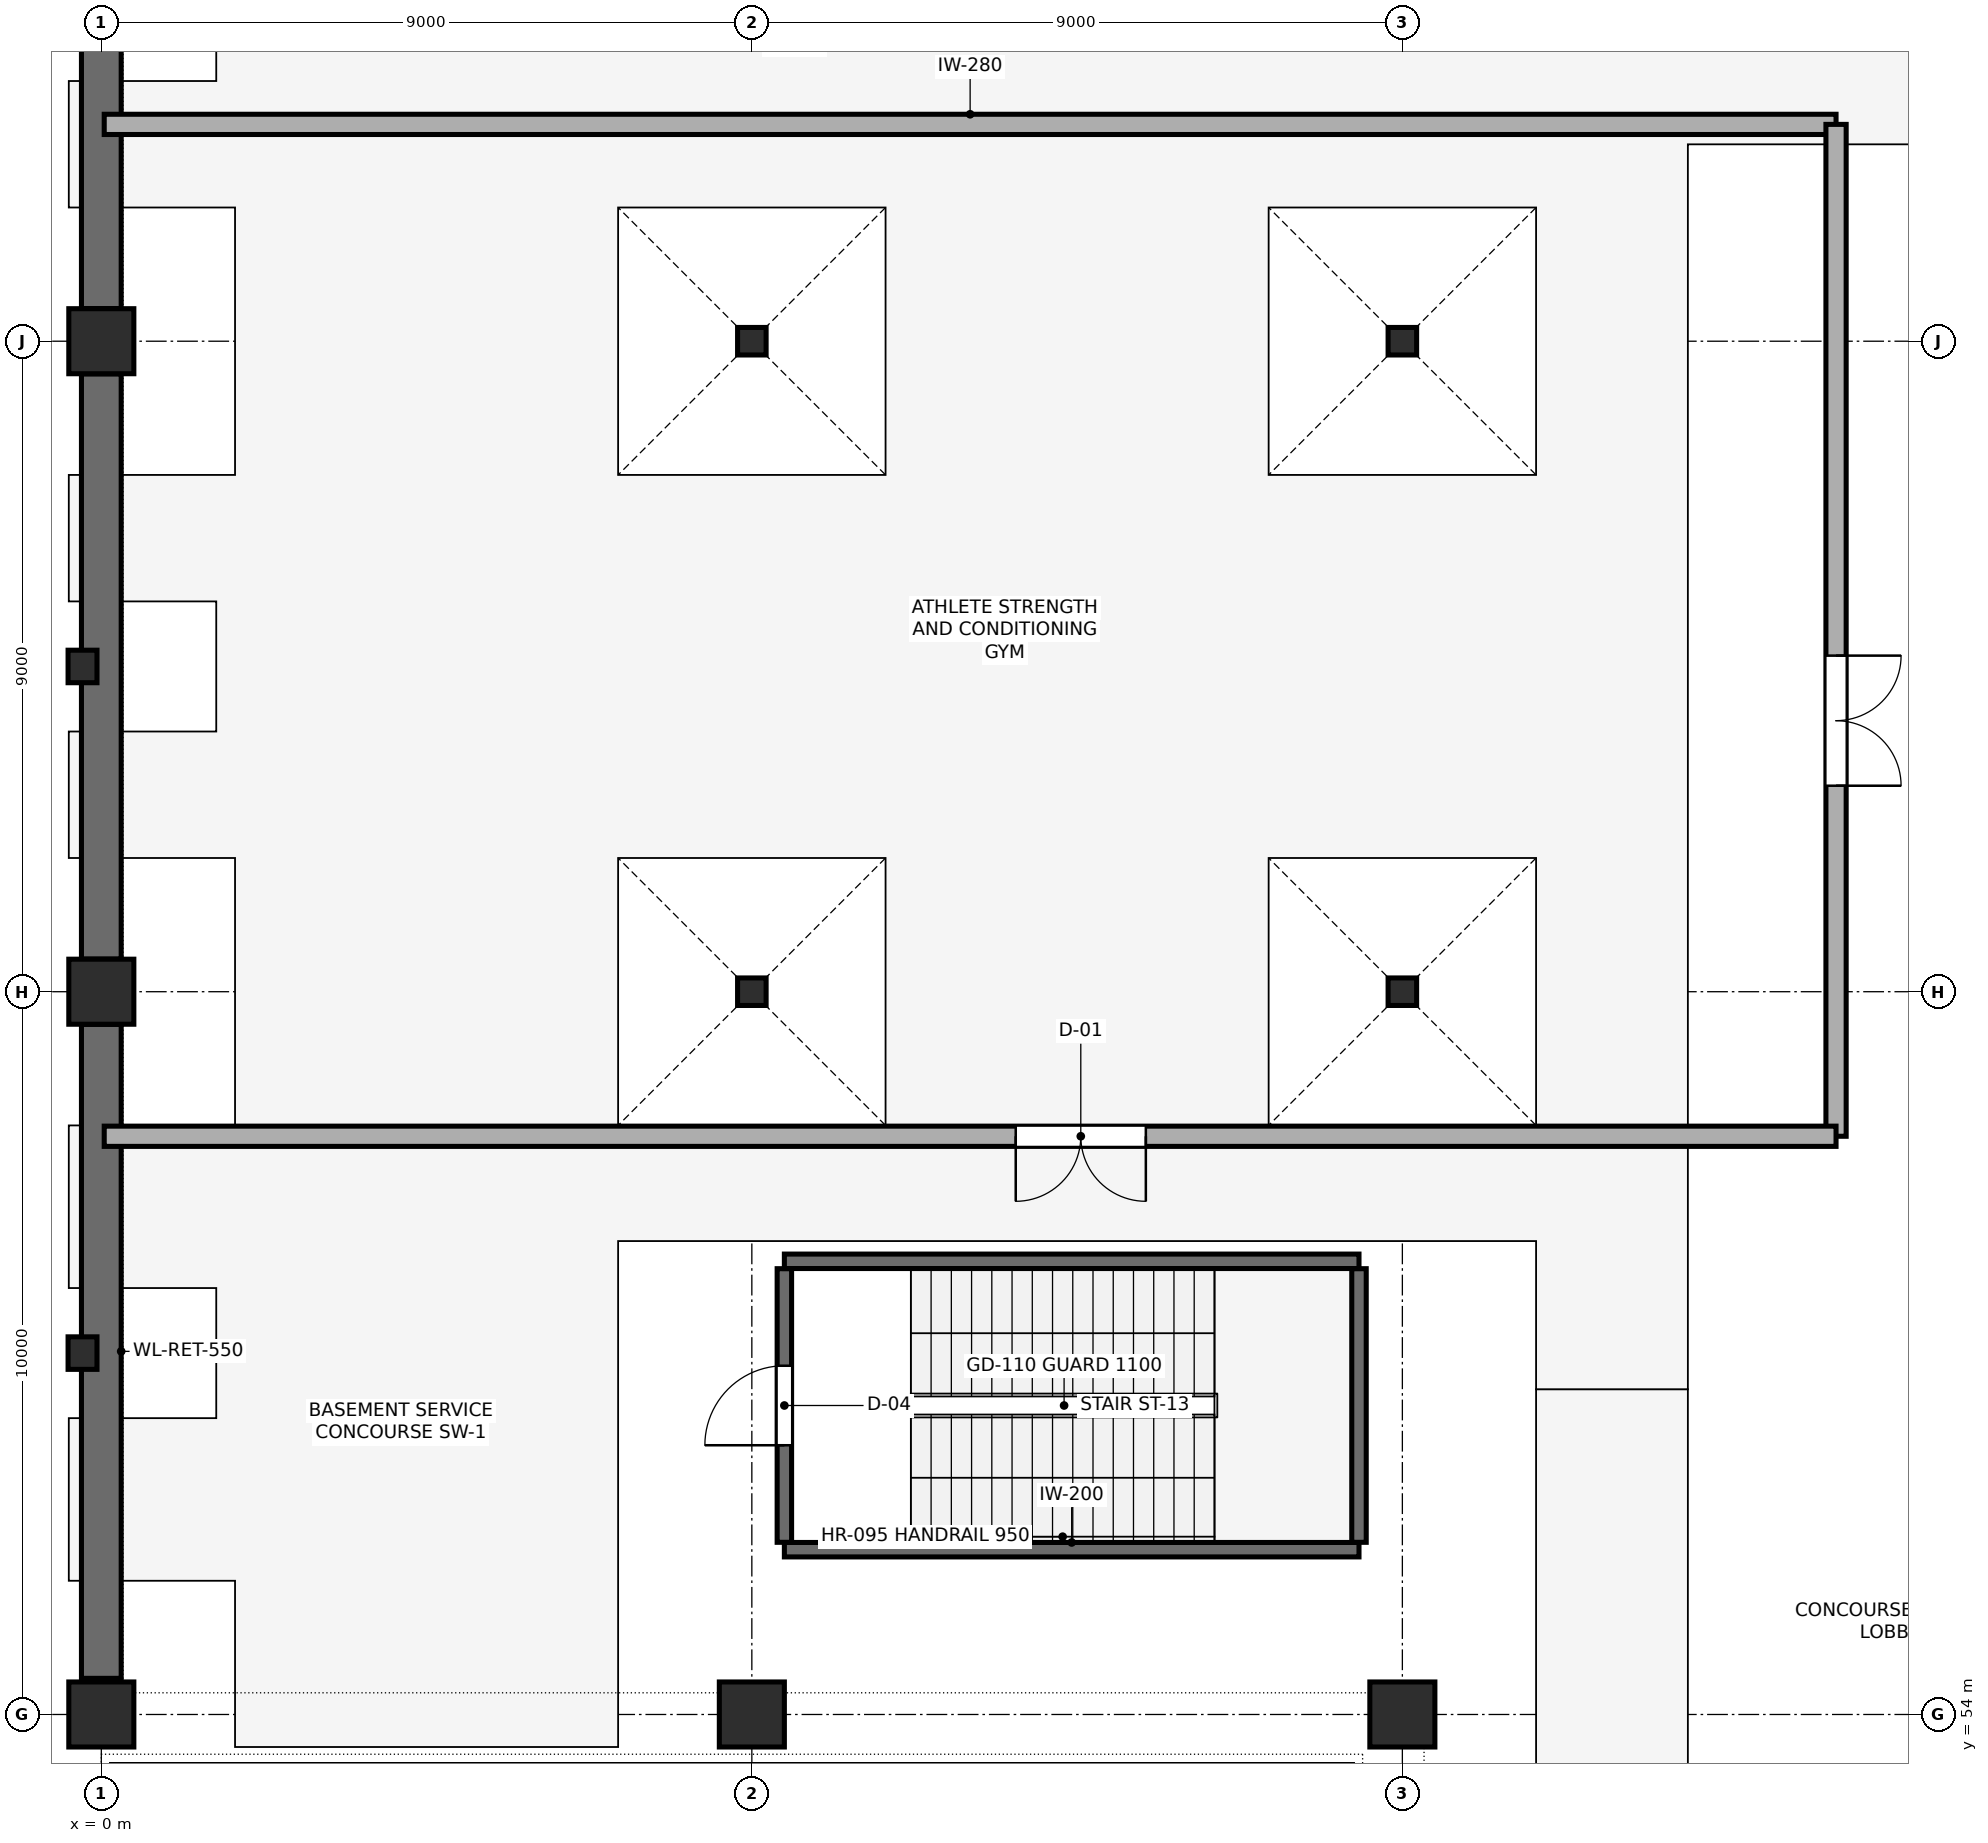
"""IFC4 building model, lengths in metres.
Left out: names, types, materials, properties, quantities, classifications, styles, units other than length and angle.
Written with IfcOpenShell. Run it as: python <this file> out.ifc"""

import sys

from ifc_helpers import new_model, si_unit, direction, frame, frame_2d, origin, origin_2d, place, context, subcontext, project, spatial, rectangle, i_section, extrude, element, fill, save


model = new_model("IFC4")
c1 = context("Model", 3, precision=1e-05, world=origin(), true_north=direction((0.0, 1.0)))
c2 = subcontext(c1, "Body", "Model", "MODEL_VIEW")
j1 = project(units=[si_unit("LENGTHUNIT", "METRE"), si_unit("PLANEANGLEUNIT", "RADIAN")], contexts=[c1])
p1 = place(None, origin())
s1 = spatial("IfcSite", under=j1, at=p1, CompositionType="ELEMENT")
p2 = place(p1, origin())
s2 = spatial("IfcBuilding", under=s1, at=p2, CompositionType="ELEMENT")
p3 = place(p2, frame((0.0, 0.0, -5.4)))
s3 = spatial("IfcBuildingStorey", under=s2, at=p3, CompositionType="ELEMENT", Elevation=-5.4)
for number, where, z_axis, x_axis in (
    (1, (0.0, 54.0, 0.0), (0.0, 0.0, 1.0), (1.0, 0.0, 0.0)),
    (2, (0.0, 64.0, 0.0), (0.0, 0.0, 1.0), (1.0, 0.0, 0.0)),
    (3, (0.0, 73.0, 0.0), (0.0, 0.0, 1.0), (1.0, 0.0, 0.0)),
    (4, (9.0, 54.0, 0.0), (0.0, 0.0, 1.0), (1.0, 0.0, 0.0)),
):
    element("IfcColumn", number, at=place(p3, frame(where, z_axis=z_axis, x_axis=x_axis)), inside=s3, PredefinedType="COLUMN", context=c2, shape_type="SweptSolid", body=[
        extrude(rectangle(XDim=0.9, YDim=0.9, at=origin_2d()), origin(), (0.0, 0.0, 1.0), 5.4),
    ])
for number, where, z_axis, x_axis in (
    (5, (9.0, 64.0, 0.0), (0.0, 0.0, 1.0), (1.0, 0.0, 0.0)),
    (6, (9.0, 73.0, 0.0), (0.0, 0.0, 1.0), (1.0, 0.0, 0.0)),
):
    element("IfcColumn", number, at=place(p3, frame(where, z_axis=z_axis, x_axis=x_axis)), inside=s3, PredefinedType="COLUMN", context=c2, shape_type="SweptSolid", body=[
        extrude(i_section(OverallWidth=0.395, OverallDepth=0.381, WebThickness=0.018, FlangeThickness=0.03, FilletRadius=0.015, at=origin_2d()), origin(), (0.0, 0.0, 1.0), 5.4),
    ])
p4 = place(p3, frame((18.0, 54.0, 0.0), z_axis=(0.0, 0.0, 1.0), x_axis=(1.0, 0.0, 0.0)))
e7 = element("IfcColumn", 7, at=p4, inside=s3, PredefinedType="COLUMN", context=c2, shape_type="SweptSolid", body=[
    extrude(rectangle(XDim=0.9, YDim=0.9, at=origin_2d()), origin(), (0.0, 0.0, 1.0), 5.4),
])
for number, where, z_axis, x_axis in (
    (8, (18.0, 64.0, 0.0), (0.0, 0.0, 1.0), (1.0, 0.0, 0.0)),
    (9, (18.0, 73.0, 0.0), (0.0, 0.0, 1.0), (1.0, 0.0, 0.0)),
):
    element("IfcColumn", number, at=place(p3, frame(where, z_axis=z_axis, x_axis=x_axis)), inside=s3, PredefinedType="COLUMN", context=c2, shape_type="SweptSolid", body=[
        extrude(i_section(OverallWidth=0.395, OverallDepth=0.381, WebThickness=0.018, FlangeThickness=0.03, FilletRadius=0.015, at=origin_2d()), origin(), (0.0, 0.0, 1.0), 5.4),
    ])
for number, where, z_axis, x_axis in (
    (10, (-0.26, 59.0, 0.0), (0.0, 0.0, 1.0), (1.0, 0.0, 0.0)),
    (11, (-0.26, 68.5, 0.0), (0.0, 0.0, 1.0), (1.0, 0.0, 0.0)),
):
    element("IfcColumn", number, at=place(p3, frame(where, z_axis=z_axis, x_axis=x_axis)), inside=s3, PredefinedType="PILASTER", context=c2, shape_type="SweptSolid", body=[
        extrude(rectangle(XDim=0.4, YDim=0.45, at=origin_2d()), origin(), (0.0, 0.0, 1.0), 5.4),
    ])
p5 = place(p3, frame((0.0, 54.5, 0.0), z_axis=(0.0, 0.0, 1.0), x_axis=(0.0, 1.0, 0.0)))
e12 = element("IfcWall", 12, at=p5, inside=s3, PredefinedType="SOLIDWALL", context=c2, shape_type="SweptSolid", body=[
    extrude(rectangle(XDim=9.048, YDim=0.55, at=frame_2d((4.524, 0.0))), origin(), (0.0, 0.0, 1.0), 5.04),
])
for number, where, z_axis, x_axis in (
    (13, (0.0, 64.452, 0.0), (0.0, 0.0, 1.0), (0.0, 1.0, 0.0)),
    (14, (0.0, 73.452, 0.0), (0.0, 0.0, 1.0), (0.0, 1.0, 0.0)),
):
    element("IfcWall", number, at=place(p3, frame(where, z_axis=z_axis, x_axis=x_axis)), inside=s3, PredefinedType="SOLIDWALL", context=c2, shape_type="SweptSolid", body=[
        extrude(rectangle(XDim=8.096, YDim=0.55, at=frame_2d((4.048, 0.0))), origin(), (0.0, 0.0, 1.0), 5.04),
    ])
p6 = place(p3, frame((9.45, 56.28, 0.0), z_axis=(0.0, 0.0, 1.0), x_axis=(1.0, 0.0, 0.0)))
e15 = element("IfcWall", 15, at=p6, inside=s3, PredefinedType="SHEAR", context=c2, shape_type="SweptSolid", body=[
    extrude(rectangle(XDim=7.95, YDim=0.2, at=frame_2d((3.975, 0.0))), origin(), (0.0, 0.0, 1.0), 5.4),
])
p7 = place(p3, frame((9.45, 56.382, 0.0), z_axis=(0.0, 0.0, 1.0), x_axis=(0.0, 1.0, 0.0)))
e16 = element("IfcWall", 16, at=p7, inside=s3, PredefinedType="SHEAR", context=c2, shape_type="SweptSolid", body=[
    extrude(rectangle(XDim=3.786, YDim=0.2, at=frame_2d((1.893, 0.0))), origin(), (0.0, 0.0, 1.0), 5.4),
])
p8 = place(p7, frame((1.343, 0.0, 0.0)))
e17 = element("IfcOpeningElement", 17, at=p8, cuts=e16, PredefinedType="OPENING", context=c2, shape_type="SweptSolid", body=[
    extrude(rectangle(XDim=1.1, YDim=2.15, at=frame_2d((0.55, 1.075))), frame((0.0, 0.11, 0.0), z_axis=(0.0, -1.0, 0.0), x_axis=(1.0, 0.0, 0.0)), (0.0, 0.0, 1.0), 0.22),
])
p9 = place(p3, frame((17.4, 56.382, 0.0), z_axis=(0.0, 0.0, 1.0), x_axis=(0.0, 1.0, 0.0)))
e18 = element("IfcWall", 18, at=p9, inside=s3, PredefinedType="SHEAR", context=c2, shape_type="SweptSolid", body=[
    extrude(rectangle(XDim=3.786, YDim=0.2, at=frame_2d((1.893, 0.0))), origin(), (0.0, 0.0, 1.0), 5.4),
])
p10 = place(p3, frame((9.45, 60.27, 0.0), z_axis=(0.0, 0.0, 1.0), x_axis=(1.0, 0.0, 0.0)))
e19 = element("IfcWall", 19, at=p10, inside=s3, PredefinedType="SHEAR", context=c2, shape_type="SweptSolid", body=[
    extrude(rectangle(XDim=7.95, YDim=0.2, at=frame_2d((3.975, 0.0))), origin(), (0.0, 0.0, 1.0), 5.4),
])
p11 = place(p3, frame((0.04, 76.0, 0.0), z_axis=(0.0, 0.0, 1.0), x_axis=(1.0, 0.0, 0.0)))
e20 = element("IfcWall", 20, at=p11, inside=s3, PredefinedType="PARTITIONING", context=c2, shape_type="SweptSolid", body=[
    extrude(rectangle(XDim=23.96, YDim=0.28, at=frame_2d((11.98, 0.0))), origin(), (0.0, 0.0, 1.0), 4.578),
])
p12 = place(p3, frame((24.0, 76.0, 0.0), z_axis=(0.0, 0.0, 1.0), x_axis=(0.0, -1.0, 0.0)))
e21 = element("IfcWall", 21, at=p12, inside=s3, PredefinedType="PARTITIONING", context=c2, shape_type="SweptSolid", body=[
    extrude(rectangle(XDim=14.0, YDim=0.28, at=frame_2d((7.0, 0.0))), origin(), (0.0, 0.0, 1.0), 5.04),
])
p13 = place(p12, frame((7.35, 0.0, 0.0)))
e22 = element("IfcOpeningElement", 22, at=p13, cuts=e21, PredefinedType="OPENING", context=c2, shape_type="SweptSolid", body=[
    extrude(rectangle(XDim=1.8, YDim=2.2, at=frame_2d((0.9, 1.1))), frame((0.0, 0.15, 0.0), z_axis=(0.0, -1.0, 0.0), x_axis=(1.0, 0.0, 0.0)), (0.0, 0.0, 1.0), 0.3),
])
p14 = place(p3, frame((24.0, 62.0, 0.0), z_axis=(0.0, 0.0, 1.0), x_axis=(-1.0, 0.0, 0.0)))
e23 = element("IfcWall", 23, at=p14, inside=s3, PredefinedType="PARTITIONING", context=c2, shape_type="SweptSolid", body=[
    extrude(rectangle(XDim=23.96, YDim=0.28, at=frame_2d((11.98, 0.0))), origin(), (0.0, 0.0, 1.0), 5.04),
])
p15 = place(p14, frame((9.549, 0.0, 0.0)))
e24 = element("IfcOpeningElement", 24, at=p15, cuts=e23, PredefinedType="OPENING", context=c2, shape_type="SweptSolid", body=[
    extrude(rectangle(XDim=1.8, YDim=2.2, at=frame_2d((0.9, 1.1))), frame((0.0, 0.15, 0.0), z_axis=(0.0, -1.0, 0.0), x_axis=(1.0, 0.0, 0.0)), (0.0, 0.0, 1.0), 0.3),
])
p16 = place(p8, frame((1.1, 0.0, 0.0), z_axis=(0.0, 0.0, 1.0), x_axis=(-1.0, 0.0, 0.0)))
e25 = element("IfcDoor", 25, at=p16, inside=s3, OperationType="SINGLE_SWING_RIGHT", PredefinedType="DOOR", context=c2, shape_type="SweptSolid", body=[
    extrude(rectangle(XDim=1.1, YDim=2.15, at=frame_2d((0.55, 1.075))), frame((0.0, 0.025, 0.0), z_axis=(0.0, -1.0, 0.0), x_axis=(1.0, 0.0, 0.0)), (0.0, 0.0, 1.0), 0.05),
])
fill(e17, e25)
p17 = place(p15, origin())
e26 = element("IfcDoor", 26, at=p17, inside=s3, OperationType="DOUBLE_DOOR_SINGLE_SWING", PredefinedType="DOOR", context=c2, shape_type="SweptSolid", body=[
    extrude(rectangle(XDim=1.8, YDim=2.2, at=frame_2d((0.9, 1.1))), frame((0.0, 0.025, 0.0), z_axis=(0.0, -1.0, 0.0), x_axis=(1.0, 0.0, 0.0)), (0.0, 0.0, 1.0), 0.05),
])
fill(e24, e26)
p18 = place(p13, origin())
e27 = element("IfcDoor", 27, at=p18, inside=s3, OperationType="DOUBLE_DOOR_SINGLE_SWING", PredefinedType="DOOR", context=c2, shape_type="SweptSolid", body=[
    extrude(rectangle(XDim=1.8, YDim=2.2, at=frame_2d((0.9, 1.1))), frame((0.0, 0.025, 0.0), z_axis=(0.0, -1.0, 0.0), x_axis=(1.0, 0.0, 0.0)), (0.0, 0.0, 1.0), 0.05),
])
fill(e22, e27)
save(model, sys.argv[1])
